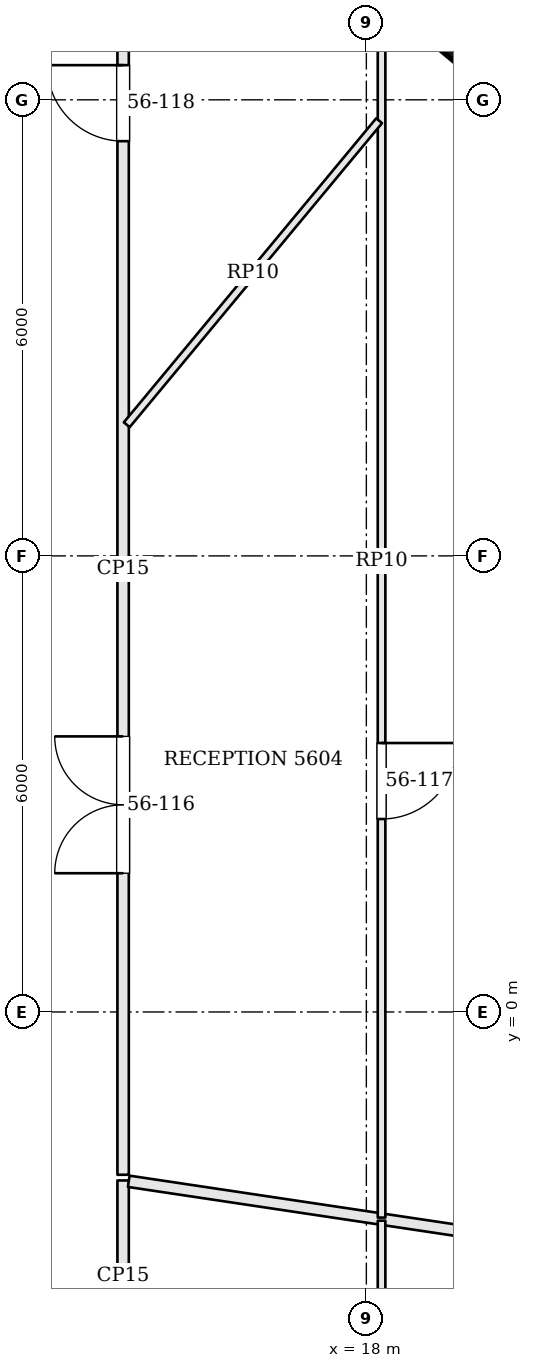
"""IFC4 building model, lengths in metres.
Left out: names, types, materials, properties, quantities, classifications, styles, units other than length and angle.
Written with IfcOpenShell. Run it as: python <this file> out.ifc"""

import sys

from ifc_helpers import new_model, si_unit, direction, frame, frame_2d, origin, origin_2d, place, context, subcontext, project, spatial, rectangle, extrude, element, fill, save


model = new_model("IFC4")
c1 = context("Model", 3, precision=1e-05, world=origin(), true_north=direction((0.0, 1.0)))
c2 = subcontext(c1, "Body", "Model", "MODEL_VIEW")
j1 = project(units=[si_unit("LENGTHUNIT", "METRE"), si_unit("PLANEANGLEUNIT", "RADIAN")], contexts=[c1])
p1 = place(None, origin())
s1 = spatial("IfcSite", under=j1, at=p1, CompositionType="ELEMENT")
p2 = place(p1, origin())
s2 = spatial("IfcBuilding", under=s1, at=p2, CompositionType="ELEMENT")
p3 = place(p2, frame((0.0, 0.0, 229.2)))
s3 = spatial("IfcBuildingStorey", under=s2, at=p3, CompositionType="ELEMENT", Elevation=229.2)
p4 = place(p3, frame((19.092, 13.209, 0.0), z_axis=(0.0, 0.0, 1.0), x_axis=(-0.76886986222, 0.63940529789, 0.0)))
e1 = element("IfcColumn", 1, at=p4, inside=s3, PredefinedType="COLUMN", context=c2, shape_type="SweptSolid", body=[
    extrude(rectangle(XDim=1.0, YDim=1.0, at=origin_2d()), origin(), (0.0, 0.0, 1.0), 3.9),
])
p5 = place(p3, frame((14.8, -4.725, 0.0), z_axis=(0.0, 0.0, 1.0), x_axis=(0.0, 1.0, 0.0)))
e2 = element("IfcWall", 2, at=p5, inside=s3, PredefinedType="PARTITIONING", context=c2, shape_type="SweptSolid", body=[
    extrude(rectangle(XDim=2.508, YDim=0.15, at=frame_2d((1.254, 0.0))), origin(), (0.0, 0.0, 1.0), 3.084),
])
p6 = place(p3, frame((26.957, -4.036, 0.0), z_axis=(0.0, 0.0, 1.0), x_axis=(-0.988991396253, 0.147973031788, 0.0)))
e3 = element("IfcWall", 3, at=p6, inside=s3, PredefinedType="PARTITIONING", context=c2, shape_type="SweptSolid", body=[
    extrude(rectangle(XDim=12.218, YDim=0.15, at=frame_2d((6.109, 0.0))), origin(), (0.0, 0.0, 1.0), 3.234),
])
p7 = place(p3, frame((14.8, -2.142, 0.0), z_axis=(0.0, 0.0, 1.0), x_axis=(0.0, 1.0, 0.0)))
e4 = element("IfcWall", 4, at=p7, inside=s3, PredefinedType="PARTITIONING", context=c2, shape_type="SweptSolid", body=[
    extrude(rectangle(XDim=15.942, YDim=0.15, at=frame_2d((7.971, 0.0))), origin(), (0.0, 0.0, 1.0), 3.084),
])
p8 = place(p7, frame((3.967, 0.0, 0.0)))
e5 = element("IfcOpeningElement", 5, at=p8, cuts=e4, PredefinedType="OPENING", context=c2, shape_type="SweptSolid", body=[
    extrude(rectangle(XDim=1.8, YDim=2.1, at=frame_2d((0.9, 1.05))), frame((0.0, 0.085, 0.0), z_axis=(0.0, -1.0, 0.0), x_axis=(1.0, 0.0, 0.0)), (0.0, 0.0, 1.0), 0.17),
])
p9 = place(p7, frame((13.598, 0.0, 0.0)))
e6 = element("IfcOpeningElement", 6, at=p9, cuts=e4, PredefinedType="OPENING", context=c2, shape_type="SweptSolid", body=[
    extrude(rectangle(XDim=1.0, YDim=2.4, at=frame_2d((0.5, 1.2))), frame((0.0, 0.085, 0.0), z_axis=(0.0, -1.0, 0.0), x_axis=(1.0, 0.0, 0.0)), (0.0, 0.0, 1.0), 0.17),
])
p10 = place(p3, frame((18.2, -2.746, 0.0), z_axis=(0.0, 0.0, 1.0), x_axis=(0.0, -1.0, 0.0)))
e7 = element("IfcWall", 7, at=p10, inside=s3, PredefinedType="PARTITIONING", context=c2, shape_type="SweptSolid", body=[
    extrude(rectangle(XDim=5.454, YDim=0.1, at=frame_2d((2.727, 0.0))), origin(), (0.0, 0.0, 1.0), 3.084),
])
p11 = place(p10, frame((1.391, 0.0, 0.0)))
e8 = element("IfcOpeningElement", 8, at=p11, cuts=e7, PredefinedType="OPENING", context=c2, shape_type="SweptSolid", body=[
    extrude(rectangle(XDim=0.9, YDim=2.1, at=frame_2d((0.45, 1.05))), frame((0.0, 0.06, 0.0), z_axis=(0.0, -1.0, 0.0), x_axis=(1.0, 0.0, 0.0)), (0.0, 0.0, 1.0), 0.12),
])
p12 = place(p3, frame((18.2, 14.562, 0.0), z_axis=(0.0, 0.0, 1.0), x_axis=(0.0, -1.0, 0.0)))
e9 = element("IfcWall", 9, at=p12, inside=s3, PredefinedType="PARTITIONING", context=c2, shape_type="SweptSolid", body=[
    extrude(rectangle(XDim=17.267, YDim=0.1, at=frame_2d((8.634, 0.0))), origin(), (0.0, 0.0, 1.0), 3.084),
])
p13 = place(p12, frame((11.024, 0.0, 0.0)))
e10 = element("IfcOpeningElement", 10, at=p13, cuts=e9, PredefinedType="OPENING", context=c2, shape_type="SweptSolid", body=[
    extrude(rectangle(XDim=1.0, YDim=2.1, at=frame_2d((0.5, 1.05))), frame((0.0, 0.06, 0.0), z_axis=(0.0, -1.0, 0.0), x_axis=(1.0, 0.0, 0.0)), (0.0, 0.0, 1.0), 0.12),
])
p14 = place(p3, frame((14.848, 7.725, 0.0), z_axis=(0.0, 0.0, 1.0), x_axis=(0.638751178804, 0.769413368468, 0.0)))
e11 = element("IfcWall", 11, at=p14, inside=s3, PredefinedType="PARTITIONING", context=c2, shape_type="SweptSolid", body=[
    extrude(rectangle(XDim=5.198, YDim=0.1, at=frame_2d((2.599, 0.0))), origin(), (0.0, 0.0, 1.0), 3.084),
])
p15 = place(p8, origin())
e12 = element("IfcDoor", 12, at=p15, inside=s3, OperationType="DOUBLE_DOOR_SINGLE_SWING", PredefinedType="DOOR", context=c2, shape_type="SweptSolid", body=[
    extrude(rectangle(XDim=1.8, YDim=2.1, at=frame_2d((0.9, 1.05))), frame((0.0, 0.025, 0.0), z_axis=(0.0, -1.0, 0.0), x_axis=(1.0, 0.0, 0.0)), (0.0, 0.0, 1.0), 0.05),
])
fill(e5, e12)
p16 = place(p13, origin())
e13 = element("IfcDoor", 13, at=p16, inside=s3, OperationType="SINGLE_SWING_LEFT", PredefinedType="DOOR", context=c2, shape_type="SweptSolid", body=[
    extrude(rectangle(XDim=1.0, YDim=2.1, at=frame_2d((0.5, 1.05))), frame((0.0, 0.025, 0.0), z_axis=(0.0, -1.0, 0.0), x_axis=(1.0, 0.0, 0.0)), (0.0, 0.0, 1.0), 0.05),
])
fill(e10, e13)
p17 = place(p9, origin())
e14 = element("IfcDoor", 14, at=p17, inside=s3, OperationType="SINGLE_SWING_RIGHT", PredefinedType="DOOR", context=c2, shape_type="SweptSolid", body=[
    extrude(rectangle(XDim=1.0, YDim=2.4, at=frame_2d((0.5, 1.2))), frame((0.0, 0.025, 0.0), z_axis=(0.0, -1.0, 0.0), x_axis=(1.0, 0.0, 0.0)), (0.0, 0.0, 1.0), 0.05),
])
fill(e6, e14)
save(model, sys.argv[1])
